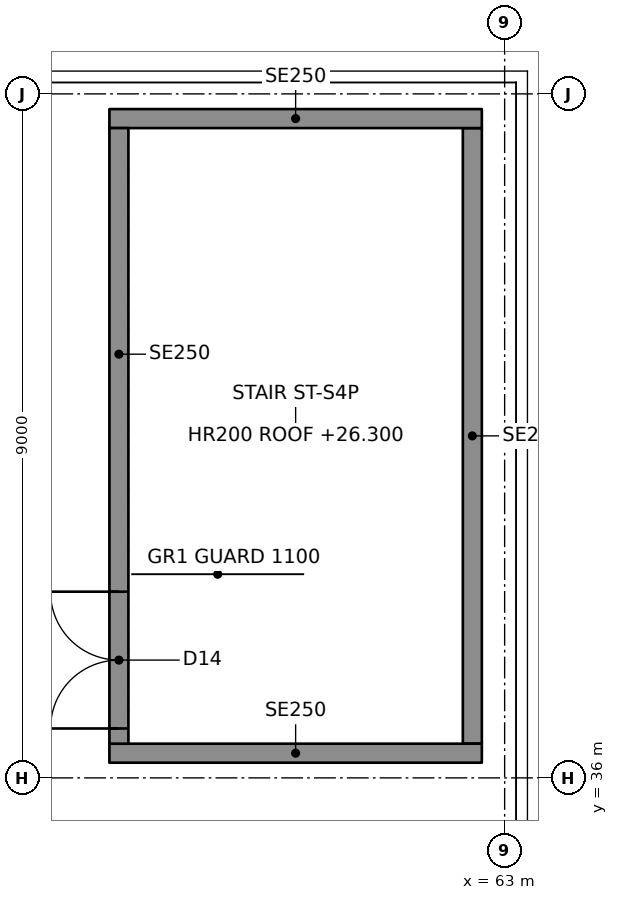
"""IFC4 building model, lengths in metres.
Left out: names, types, materials, properties, quantities, classifications, styles, units other than length and angle.
Written with IfcOpenShell. Run it as: python <this file> out.ifc"""

import sys

from ifc_helpers import new_model, si_unit, direction, frame, frame_2d, origin, place, context, subcontext, project, spatial, rectangle, extrude, element, fill, save


model = new_model("IFC4")
c1 = context("Model", 3, precision=1e-05, world=origin(), true_north=direction((0.0, 1.0)))
c2 = subcontext(c1, "Body", "Model", "MODEL_VIEW")
j1 = project(units=[si_unit("LENGTHUNIT", "METRE"), si_unit("PLANEANGLEUNIT", "RADIAN")], contexts=[c1])
p1 = place(None, origin())
s1 = spatial("IfcSite", under=j1, at=p1, CompositionType="ELEMENT")
p2 = place(p1, origin())
s2 = spatial("IfcBuilding", under=s1, at=p2, CompositionType="ELEMENT")
p3 = place(p2, frame((0.0, 0.0, 23.0)))
s3 = spatial("IfcBuildingStorey", under=s2, at=p3, CompositionType="ELEMENT", Elevation=23.0)
for number, where, z_axis, x_axis in (
    (1, (57.8, 36.325, 0.0), (0.0, 0.0, 1.0), (1.0, 0.0, 0.0)),
    (2, (57.8, 44.675, 0.0), (0.0, 0.0, 1.0), (1.0, 0.0, 0.0)),
):
    element("IfcWall", number, at=place(p3, frame(where, z_axis=z_axis, x_axis=x_axis)), inside=s3, PredefinedType="SOLIDWALL", context=c2, shape_type="SweptSolid", body=[
        extrude(rectangle(XDim=4.9, YDim=0.25, at=frame_2d((2.45, 0.0))), origin(), (0.0, 0.0, 1.0), 3.1),
    ])
p4 = place(p3, frame((57.925, 36.45, 0.0), z_axis=(0.0, 0.0, 1.0), x_axis=(0.0, 1.0, 0.0)))
e3 = element("IfcWall", 3, at=p4, inside=s3, PredefinedType="SOLIDWALL", context=c2, shape_type="SweptSolid", body=[
    extrude(rectangle(XDim=8.1, YDim=0.25, at=frame_2d((4.05, 0.0))), origin(), (0.0, 0.0, 1.0), 3.1),
])
p5 = place(p4, frame((0.2, 0.0, 0.0)))
e4 = element("IfcOpeningElement", 4, at=p5, cuts=e3, PredefinedType="OPENING", context=c2, shape_type="SweptSolid", body=[
    extrude(rectangle(XDim=1.8, YDim=2.1, at=frame_2d((0.9, 1.05))), frame((0.0, 0.135, 0.0), z_axis=(0.0, -1.0, 0.0), x_axis=(1.0, 0.0, 0.0)), (0.0, 0.0, 1.0), 0.27),
])
p6 = place(p3, frame((62.575, 36.45, 0.0), z_axis=(0.0, 0.0, 1.0), x_axis=(0.0, 1.0, 0.0)))
e5 = element("IfcWall", 5, at=p6, inside=s3, PredefinedType="SOLIDWALL", context=c2, shape_type="SweptSolid", body=[
    extrude(rectangle(XDim=8.1, YDim=0.25, at=frame_2d((4.05, 0.0))), origin(), (0.0, 0.0, 1.0), 3.1),
])
p7 = place(p5, origin())
e6 = element("IfcDoor", 6, at=p7, inside=s3, OperationType="DOUBLE_DOOR_SINGLE_SWING", PredefinedType="DOOR", context=c2, shape_type="SweptSolid", body=[
    extrude(rectangle(XDim=1.8, YDim=2.1, at=frame_2d((0.9, 1.05))), frame((0.0, 0.025, 0.0), z_axis=(0.0, -1.0, 0.0), x_axis=(1.0, 0.0, 0.0)), (0.0, 0.0, 1.0), 0.05),
])
fill(e4, e6)
save(model, sys.argv[1])
